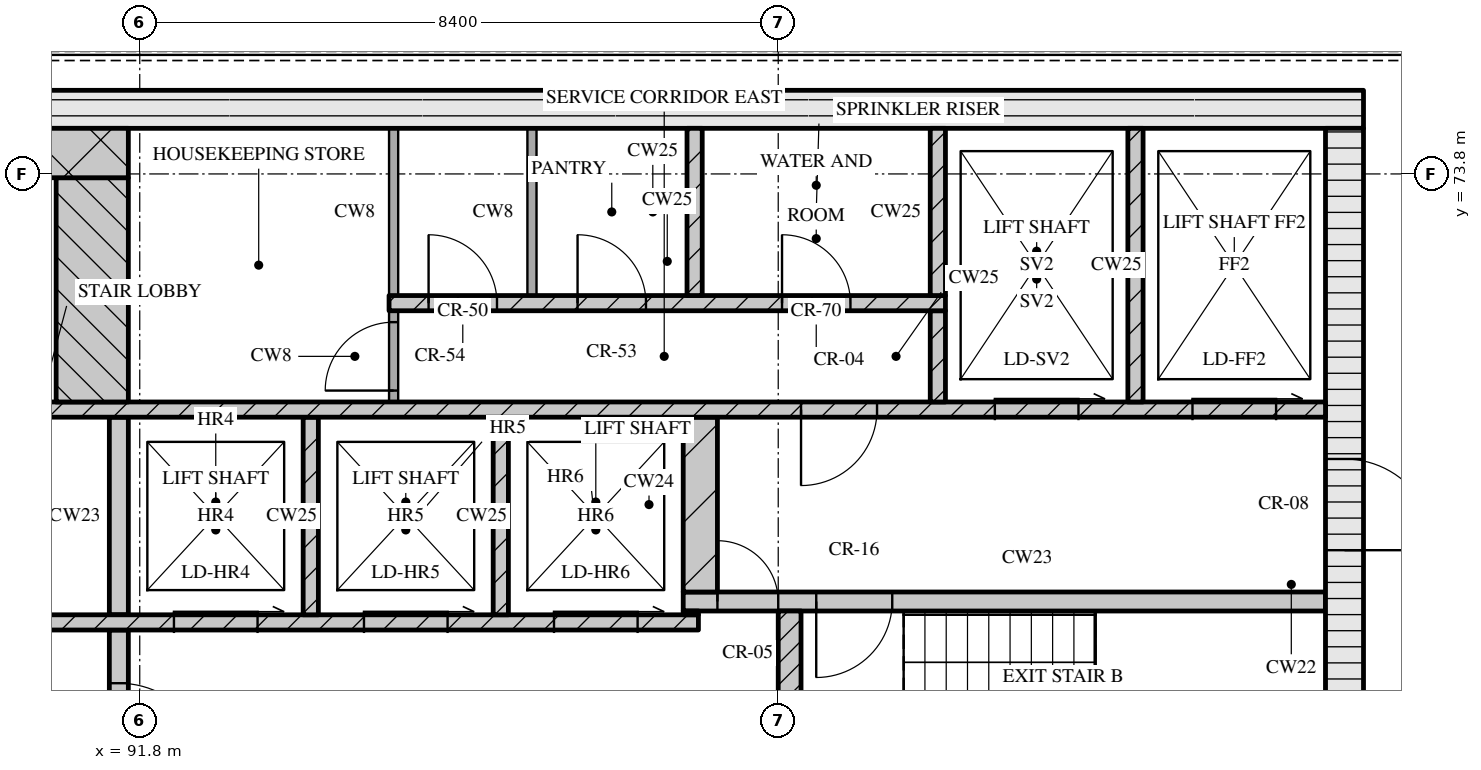
"""IFC4 building model, lengths in metres.
Left out: names, types, materials, properties, quantities, classifications, styles, units other than length and angle.
Written with IfcOpenShell. Run it as: python <this file> out.ifc"""

import sys

from ifc_helpers import new_model, si_unit, direction, frame, frame_2d, origin, place, context, subcontext, project, spatial, rectangle, extrude, element, fill, save


model = new_model("IFC4")
c1 = context("Model", 3, precision=1e-05, world=origin(), true_north=direction((0.0, 1.0)))
c2 = subcontext(c1, "Body", "Model", "MODEL_VIEW")
j1 = project(units=[si_unit("LENGTHUNIT", "METRE"), si_unit("PLANEANGLEUNIT", "RADIAN")], contexts=[c1])
p1 = place(None, origin())
s1 = spatial("IfcSite", under=j1, at=p1, CompositionType="ELEMENT")
p2 = place(p1, origin())
s2 = spatial("IfcBuilding", under=s1, at=p2, CompositionType="ELEMENT")
p3 = place(p2, frame((0.0, 0.0, 277.95)))
s3 = spatial("IfcBuildingStorey", under=s2, at=p3, CompositionType="ELEMENT", Elevation=277.95)
p4 = place(p3, frame((67.3, 74.65, 0.0), z_axis=(0.0, 0.0, 1.0), x_axis=(1.0, 0.0, 0.0)))
e1 = element("IfcWall", 1, at=p4, inside=s3, PredefinedType="SOLIDWALL", context=c2, shape_type="SweptSolid", body=[
    extrude(rectangle(XDim=40.6, YDim=0.5, at=frame_2d((20.3, 0.0))), origin(), (0.0, 0.0, 1.0), 3.32),
])
p5 = place(p3, frame((107.65, 62.4, 0.0), z_axis=(0.0, 0.0, 1.0), x_axis=(0.0, 1.0, 0.0)))
e2 = element("IfcWall", 2, at=p5, inside=s3, PredefinedType="SOLIDWALL", context=c2, shape_type="SweptSolid", body=[
    extrude(rectangle(XDim=12.0, YDim=0.5, at=frame_2d((6.0, 0.0))), origin(), (0.0, 0.0, 1.0), 3.32),
])
p6 = place(p5, frame((6.45, 0.0, 0.0)))
e3 = element("IfcOpeningElement", 3, at=p6, cuts=e2, PredefinedType="OPENING", context=c2, shape_type="SweptSolid", body=[
    extrude(rectangle(XDim=1.2, YDim=2.1, at=frame_2d((0.6, 1.05))), frame((0.0, 0.26, 0.0), z_axis=(0.0, -1.0, 0.0), x_axis=(1.0, 0.0, 0.0)), (0.0, 0.0, 1.0), 0.52),
])
p7 = place(p3, frame((91.525, 65.2, 0.0), z_axis=(0.0, 0.0, 1.0), x_axis=(0.0, 1.0, 0.0)))
e4 = element("IfcWall", 4, at=p7, inside=s3, PredefinedType="SOLIDWALL", context=c2, shape_type="SweptSolid", body=[
    extrude(rectangle(XDim=2.6, YDim=0.25, at=frame_2d((1.3, 0.0))), origin(), (0.0, 0.0, 1.0), 3.32),
])
p8 = place(p7, frame((0.7, 0.0, 0.0)))
e5 = element("IfcOpeningElement", 5, at=p8, cuts=e4, PredefinedType="OPENING", context=c2, shape_type="SweptSolid", body=[
    extrude(rectangle(XDim=1.2, YDim=2.1, at=frame_2d((0.6, 1.05))), frame((0.0, 0.135, 0.0), z_axis=(0.0, -1.0, 0.0), x_axis=(1.0, 0.0, 0.0)), (0.0, 0.0, 1.0), 0.27),
])
p9 = place(p3, frame((100.35, 65.2, 0.0), z_axis=(0.0, 0.0, 1.0), x_axis=(0.0, 1.0, 0.0)))
e6 = element("IfcWall", 6, at=p9, inside=s3, PredefinedType="SOLIDWALL", context=c2, shape_type="SweptSolid", body=[
    extrude(rectangle(XDim=2.85, YDim=0.3, at=frame_2d((1.425, 0.0))), origin(), (0.0, 0.0, 1.0), 3.32),
])
p10 = place(p3, frame((76.05, 67.9, 0.0), z_axis=(0.0, 0.0, 1.0), x_axis=(1.0, 0.0, 0.0)))
e7 = element("IfcWall", 7, at=p10, inside=s3, PredefinedType="SOLIDWALL", context=c2, shape_type="SweptSolid", body=[
    extrude(rectangle(XDim=23.1, YDim=0.2, at=frame_2d((11.55, 0.0))), origin(), (0.0, 0.0, 1.0), 3.32),
])
p11 = place(p10, frame((1.35, 0.0, 0.0)))
e8 = element("IfcOpeningElement", 8, at=p11, cuts=e7, PredefinedType="OPENING", context=c2, shape_type="SweptSolid", body=[
    extrude(rectangle(XDim=0.9, YDim=2.1, at=frame_2d((0.45, 1.05))), frame((0.0, 0.11, 0.0), z_axis=(0.0, -1.0, 0.0), x_axis=(1.0, 0.0, 0.0)), (0.0, 0.0, 1.0), 0.22),
])
p12 = place(p10, frame((5.06, 0.0, 0.0)))
e9 = element("IfcOpeningElement", 9, at=p12, cuts=e7, PredefinedType="OPENING", context=c2, shape_type="SweptSolid", body=[
    extrude(rectangle(XDim=0.9, YDim=2.1, at=frame_2d((0.45, 1.05))), frame((0.0, 0.11, 0.0), z_axis=(0.0, -1.0, 0.0), x_axis=(1.0, 0.0, 0.0)), (0.0, 0.0, 1.0), 0.22),
])
p13 = place(p10, frame((8.45, 0.0, 0.0)))
e10 = element("IfcOpeningElement", 10, at=p13, cuts=e7, PredefinedType="OPENING", context=c2, shape_type="SweptSolid", body=[
    extrude(rectangle(XDim=0.9, YDim=2.1, at=frame_2d((0.45, 1.05))), frame((0.0, 0.11, 0.0), z_axis=(0.0, -1.0, 0.0), x_axis=(1.0, 0.0, 0.0)), (0.0, 0.0, 1.0), 0.22),
])
p14 = place(p10, frame((10.91, 0.0, 0.0)))
e11 = element("IfcOpeningElement", 11, at=p14, cuts=e7, PredefinedType="OPENING", context=c2, shape_type="SweptSolid", body=[
    extrude(rectangle(XDim=0.9, YDim=2.1, at=frame_2d((0.45, 1.05))), frame((0.0, 0.11, 0.0), z_axis=(0.0, -1.0, 0.0), x_axis=(1.0, 0.0, 0.0)), (0.0, 0.0, 1.0), 0.22),
])
p15 = place(p10, frame((13.55, 0.0, 0.0)))
e12 = element("IfcOpeningElement", 12, at=p15, cuts=e7, PredefinedType="OPENING", context=c2, shape_type="SweptSolid", body=[
    extrude(rectangle(XDim=1.0, YDim=2.1, at=frame_2d((0.5, 1.05))), frame((0.0, 0.11, 0.0), z_axis=(0.0, -1.0, 0.0), x_axis=(1.0, 0.0, 0.0)), (0.0, 0.0, 1.0), 0.22),
])
p16 = place(p10, frame((16.2, 0.0, 0.0)))
e13 = element("IfcOpeningElement", 13, at=p16, cuts=e7, PredefinedType="OPENING", context=c2, shape_type="SweptSolid", body=[
    extrude(rectangle(XDim=1.1, YDim=2.1, at=frame_2d((0.55, 1.05))), frame((0.0, 0.11, 0.0), z_axis=(0.0, -1.0, 0.0), x_axis=(1.0, 0.0, 0.0)), (0.0, 0.0, 1.0), 0.22),
])
p17 = place(p10, frame((18.7, 0.0, 0.0)))
e14 = element("IfcOpeningElement", 14, at=p17, cuts=e7, PredefinedType="OPENING", context=c2, shape_type="SweptSolid", body=[
    extrude(rectangle(XDim=1.1, YDim=2.1, at=frame_2d((0.55, 1.05))), frame((0.0, 0.11, 0.0), z_axis=(0.0, -1.0, 0.0), x_axis=(1.0, 0.0, 0.0)), (0.0, 0.0, 1.0), 0.22),
])
p18 = place(p10, frame((21.2, 0.0, 0.0)))
e15 = element("IfcOpeningElement", 15, at=p18, cuts=e7, PredefinedType="OPENING", context=c2, shape_type="SweptSolid", body=[
    extrude(rectangle(XDim=1.1, YDim=2.1, at=frame_2d((0.55, 1.05))), frame((0.0, 0.11, 0.0), z_axis=(0.0, -1.0, 0.0), x_axis=(1.0, 0.0, 0.0)), (0.0, 0.0, 1.0), 0.22),
])
p19 = place(p3, frame((91.525, 68.0, 0.0), z_axis=(0.0, 0.0, 1.0), x_axis=(0.0, 1.0, 0.0)))
e16 = element("IfcWall", 16, at=p19, inside=s3, PredefinedType="SOLIDWALL", context=c2, shape_type="SweptSolid", body=[
    extrude(rectangle(XDim=2.6, YDim=0.25, at=frame_2d((1.3, 0.0))), origin(), (0.0, 0.0, 1.0), 3.32),
])
for number, where, z_axis, x_axis in (
    (17, (94.05, 68.0, 0.0), (0.0, 0.0, 1.0), (0.0, 1.0, 0.0)),
    (18, (96.55, 68.0, 0.0), (0.0, 0.0, 1.0), (0.0, 1.0, 0.0)),
):
    element("IfcWall", number, at=place(p3, frame(where, z_axis=z_axis, x_axis=x_axis)), inside=s3, PredefinedType="SOLIDWALL", context=c2, shape_type="SweptSolid", body=[
        extrude(rectangle(XDim=2.6, YDim=0.2, at=frame_2d((1.3, 0.0))), origin(), (0.0, 0.0, 1.0), 3.32),
    ])
p20 = place(p3, frame((98.95, 68.025, 0.0), z_axis=(0.0, 0.0, 1.0), x_axis=(1.0, 0.0, 0.0)))
e19 = element("IfcWall", 19, at=p20, inside=s3, PredefinedType="SOLIDWALL", context=c2, shape_type="SweptSolid", body=[
    extrude(rectangle(XDim=0.2, YDim=0.05, at=frame_2d((0.1, 0.0))), origin(), (0.0, 0.0, 1.0), 3.32),
])
p21 = place(p3, frame((98.95, 68.175, 0.0), z_axis=(0.0, 0.0, 1.0), x_axis=(1.0, 0.0, 0.0)))
e20 = element("IfcWall", 20, at=p21, inside=s3, PredefinedType="SOLIDWALL", context=c2, shape_type="SweptSolid", body=[
    extrude(rectangle(XDim=8.45, YDim=0.25, at=frame_2d((4.225, 0.0))), origin(), (0.0, 0.0, 1.0), 3.32),
])
p22 = place(p21, frame((0.45, 0.0, 0.0)))
e21 = element("IfcOpeningElement", 21, at=p22, cuts=e20, PredefinedType="OPENING", context=c2, shape_type="SweptSolid", body=[
    extrude(rectangle(XDim=0.8, YDim=2.1, at=frame_2d((0.4, 1.05))), frame((0.0, 0.135, 0.0), z_axis=(0.0, -1.0, 0.0), x_axis=(1.0, 0.0, 0.0)), (0.0, 0.0, 1.0), 0.27),
])
p23 = place(p21, frame((1.75, 0.0, 0.0)))
e22 = element("IfcOpeningElement", 22, at=p23, cuts=e20, PredefinedType="OPENING", context=c2, shape_type="SweptSolid", body=[
    extrude(rectangle(XDim=1.0, YDim=2.1, at=frame_2d((0.5, 1.05))), frame((0.0, 0.135, 0.0), z_axis=(0.0, -1.0, 0.0), x_axis=(1.0, 0.0, 0.0)), (0.0, 0.0, 1.0), 0.27),
])
p24 = place(p3, frame((99.175, 68.3, 0.0), z_axis=(0.0, 0.0, 1.0), x_axis=(0.0, 1.0, 0.0)))
e23 = element("IfcWall", 23, at=p24, inside=s3, PredefinedType="SOLIDWALL", context=c2, shape_type="SweptSolid", body=[
    extrude(rectangle(XDim=2.3, YDim=0.45, at=frame_2d((1.15, 0.0))), origin(), (0.0, 0.0, 1.0), 3.32),
])
p25 = place(p3, frame((67.8, 70.7, 0.0), z_axis=(0.0, 0.0, 1.0), x_axis=(1.0, 0.0, 0.0)))
e24 = element("IfcWall", 24, at=p25, inside=s3, PredefinedType="SOLIDWALL", context=c2, shape_type="SweptSolid", body=[
    extrude(rectangle(XDim=39.6, YDim=0.2, at=frame_2d((19.8, 0.0))), origin(), (0.0, 0.0, 1.0), 3.32),
])
p26 = place(p25, frame((0.65, 0.0, 0.0)))
e25 = element("IfcOpeningElement", 25, at=p26, cuts=e24, PredefinedType="OPENING", context=c2, shape_type="SweptSolid", body=[
    extrude(rectangle(XDim=1.1, YDim=2.1, at=frame_2d((0.55, 1.05))), frame((0.0, 0.11, 0.0), z_axis=(0.0, -1.0, 0.0), x_axis=(1.0, 0.0, 0.0)), (0.0, 0.0, 1.0), 0.22),
])
p27 = place(p25, frame((3.25, 0.0, 0.0)))
e26 = element("IfcOpeningElement", 26, at=p27, cuts=e24, PredefinedType="OPENING", context=c2, shape_type="SweptSolid", body=[
    extrude(rectangle(XDim=1.1, YDim=2.1, at=frame_2d((0.55, 1.05))), frame((0.0, 0.11, 0.0), z_axis=(0.0, -1.0, 0.0), x_axis=(1.0, 0.0, 0.0)), (0.0, 0.0, 1.0), 0.22),
])
p28 = place(p25, frame((5.9, 0.0, 0.0)))
e27 = element("IfcOpeningElement", 27, at=p28, cuts=e24, PredefinedType="OPENING", context=c2, shape_type="SweptSolid", body=[
    extrude(rectangle(XDim=1.0, YDim=2.1, at=frame_2d((0.5, 1.05))), frame((0.0, 0.11, 0.0), z_axis=(0.0, -1.0, 0.0), x_axis=(1.0, 0.0, 0.0)), (0.0, 0.0, 1.0), 0.22),
])
p29 = place(p25, frame((21.7, 0.0, 0.0)))
e28 = element("IfcOpeningElement", 28, at=p29, cuts=e24, PredefinedType="OPENING", context=c2, shape_type="SweptSolid", body=[
    extrude(rectangle(XDim=1.0, YDim=2.1, at=frame_2d((0.5, 1.05))), frame((0.0, 0.11, 0.0), z_axis=(0.0, -1.0, 0.0), x_axis=(1.0, 0.0, 0.0)), (0.0, 0.0, 1.0), 0.22),
])
p30 = place(p25, frame((32.7, 0.0, 0.0)))
e29 = element("IfcOpeningElement", 29, at=p30, cuts=e24, PredefinedType="OPENING", context=c2, shape_type="SweptSolid", body=[
    extrude(rectangle(XDim=1.0, YDim=2.1, at=frame_2d((0.5, 1.05))), frame((0.0, 0.11, 0.0), z_axis=(0.0, -1.0, 0.0), x_axis=(1.0, 0.0, 0.0)), (0.0, 0.0, 1.0), 0.22),
])
p31 = place(p25, frame((35.25, 0.0, 0.0)))
e30 = element("IfcOpeningElement", 30, at=p31, cuts=e24, PredefinedType="OPENING", context=c2, shape_type="SweptSolid", body=[
    extrude(rectangle(XDim=1.1, YDim=2.1, at=frame_2d((0.55, 1.05))), frame((0.0, 0.11, 0.0), z_axis=(0.0, -1.0, 0.0), x_axis=(1.0, 0.0, 0.0)), (0.0, 0.0, 1.0), 0.22),
])
p32 = place(p25, frame((37.85, 0.0, 0.0)))
e31 = element("IfcOpeningElement", 31, at=p32, cuts=e24, PredefinedType="OPENING", context=c2, shape_type="SweptSolid", body=[
    extrude(rectangle(XDim=1.1, YDim=2.1, at=frame_2d((0.55, 1.05))), frame((0.0, 0.11, 0.0), z_axis=(0.0, -1.0, 0.0), x_axis=(1.0, 0.0, 0.0)), (0.0, 0.0, 1.0), 0.22),
])
p33 = place(p3, frame((91.175, 70.8, 0.0), z_axis=(0.0, 0.0, 1.0), x_axis=(0.0, 1.0, 0.0)))
e32 = element("IfcWall", 32, at=p33, inside=s3, PredefinedType="SOLIDWALL", context=c2, shape_type="SweptSolid", body=[
    extrude(rectangle(XDim=2.95, YDim=0.95, at=frame_2d((1.475, 0.0))), origin(), (0.0, 0.0, 1.0), 3.32),
])
p34 = place(p3, frame((95.14, 70.8, 0.0), z_axis=(0.0, 0.0, 1.0), x_axis=(0.0, 1.0, 0.0)))
e33 = element("IfcWall", 33, at=p34, inside=s3, PredefinedType="PARTITIONING", context=c2, shape_type="SweptSolid", body=[
    extrude(rectangle(XDim=1.2, YDim=0.12, at=frame_2d((0.6, 0.0))), origin(), (0.0, 0.0, 1.0), 3.32),
])
p35 = place(p34, frame((0.15, 0.0, 0.0)))
e34 = element("IfcOpeningElement", 34, at=p35, cuts=e33, PredefinedType="OPENING", context=c2, shape_type="SweptSolid", body=[
    extrude(rectangle(XDim=0.9, YDim=2.1, at=frame_2d((0.45, 1.05))), frame((0.0, 0.07, 0.0), z_axis=(0.0, -1.0, 0.0), x_axis=(1.0, 0.0, 0.0)), (0.0, 0.0, 1.0), 0.14),
])
p36 = place(p3, frame((102.3, 70.8, 0.0), z_axis=(0.0, 0.0, 1.0), x_axis=(0.0, 1.0, 0.0)))
e35 = element("IfcWall", 35, at=p36, inside=s3, PredefinedType="SOLIDWALL", context=c2, shape_type="SweptSolid", body=[
    extrude(rectangle(XDim=1.2, YDim=0.2, at=frame_2d((0.6, 0.0))), origin(), (0.0, 0.0, 1.0), 3.32),
])
p37 = place(p3, frame((104.9, 70.8, 0.0), z_axis=(0.0, 0.0, 1.0), x_axis=(0.0, 1.0, 0.0)))
e36 = element("IfcWall", 36, at=p37, inside=s3, PredefinedType="SOLIDWALL", context=c2, shape_type="SweptSolid", body=[
    extrude(rectangle(XDim=3.6, YDim=0.2, at=frame_2d((1.8, 0.0))), origin(), (0.0, 0.0, 1.0), 3.32),
])
p38 = place(p3, frame((95.08, 72.1, 0.0), z_axis=(0.0, 0.0, 1.0), x_axis=(1.0, 0.0, 0.0)))
e37 = element("IfcWall", 37, at=p38, inside=s3, PredefinedType="SOLIDWALL", context=c2, shape_type="SweptSolid", body=[
    extrude(rectangle(XDim=7.32, YDim=0.2, at=frame_2d((3.66, 0.0))), origin(), (0.0, 0.0, 1.0), 3.32),
])
p39 = place(p38, frame((0.52, 0.0, 0.0)))
e38 = element("IfcOpeningElement", 38, at=p39, cuts=e37, PredefinedType="OPENING", context=c2, shape_type="SweptSolid", body=[
    extrude(rectangle(XDim=0.9, YDim=2.1, at=frame_2d((0.45, 1.05))), frame((0.0, 0.11, 0.0), z_axis=(0.0, -1.0, 0.0), x_axis=(1.0, 0.0, 0.0)), (0.0, 0.0, 1.0), 0.22),
])
p40 = place(p38, frame((2.48, 0.0, 0.0)))
e39 = element("IfcOpeningElement", 39, at=p40, cuts=e37, PredefinedType="OPENING", context=c2, shape_type="SweptSolid", body=[
    extrude(rectangle(XDim=0.9, YDim=2.1, at=frame_2d((0.45, 1.05))), frame((0.0, 0.11, 0.0), z_axis=(0.0, -1.0, 0.0), x_axis=(1.0, 0.0, 0.0)), (0.0, 0.0, 1.0), 0.22),
])
p41 = place(p38, frame((5.17, 0.0, 0.0)))
e40 = element("IfcOpeningElement", 40, at=p41, cuts=e37, PredefinedType="OPENING", context=c2, shape_type="SweptSolid", body=[
    extrude(rectangle(XDim=0.9, YDim=2.1, at=frame_2d((0.45, 1.05))), frame((0.0, 0.11, 0.0), z_axis=(0.0, -1.0, 0.0), x_axis=(1.0, 0.0, 0.0)), (0.0, 0.0, 1.0), 0.22),
])
for number, where, z_axis, x_axis in (
    (41, (95.14, 72.2, 0.0), (0.0, 0.0, 1.0), (0.0, 1.0, 0.0)),
    (42, (96.96, 72.2, 0.0), (0.0, 0.0, 1.0), (0.0, 1.0, 0.0)),
):
    element("IfcWall", number, at=place(p3, frame(where, z_axis=z_axis, x_axis=x_axis)), inside=s3, PredefinedType="PARTITIONING", context=c2, shape_type="SweptSolid", body=[
        extrude(rectangle(XDim=2.2, YDim=0.12, at=frame_2d((1.1, 0.0))), origin(), (0.0, 0.0, 1.0), 3.32),
    ])
for number, where, z_axis, x_axis in (
    (43, (99.1, 72.2, 0.0), (0.0, 0.0, 1.0), (0.0, 1.0, 0.0)),
    (44, (102.3, 72.2, 0.0), (0.0, 0.0, 1.0), (0.0, 1.0, 0.0)),
):
    element("IfcWall", number, at=place(p3, frame(where, z_axis=z_axis, x_axis=x_axis)), inside=s3, PredefinedType="SOLIDWALL", context=c2, shape_type="SweptSolid", body=[
        extrude(rectangle(XDim=2.2, YDim=0.2, at=frame_2d((1.1, 0.0))), origin(), (0.0, 0.0, 1.0), 3.32),
    ])
p42 = place(p3, frame((83.55, 74.075, 0.0), z_axis=(0.0, 0.0, 1.0), x_axis=(1.0, 0.0, 0.0)))
e45 = element("IfcWall", 45, at=p42, inside=s3, PredefinedType="SOLIDWALL", context=c2, shape_type="SweptSolid", body=[
    extrude(rectangle(XDim=8.1, YDim=0.65, at=frame_2d((4.05, 0.0))), origin(), (0.0, 0.0, 1.0), 3.32),
])
p43 = place(p8, origin())
e46 = element("IfcDoor", 46, at=p43, inside=s3, OperationType="SINGLE_SWING_RIGHT", PredefinedType="DOOR", context=c2, shape_type="SweptSolid", body=[
    extrude(rectangle(XDim=1.2, YDim=2.1, at=frame_2d((0.6, 1.05))), frame((0.0, 0.025, 0.0), z_axis=(0.0, -1.0, 0.0), x_axis=(1.0, 0.0, 0.0)), (0.0, 0.0, 1.0), 0.05),
])
fill(e5, e46)
p44 = place(p16, origin())
e47 = element("IfcDoor", 47, at=p44, inside=s3, OperationType="SLIDING_TO_RIGHT", PredefinedType="DOOR", context=c2, shape_type="SweptSolid", body=[
    extrude(rectangle(XDim=1.1, YDim=2.1, at=frame_2d((0.55, 1.05))), frame((0.0, 0.025, 0.0), z_axis=(0.0, -1.0, 0.0), x_axis=(1.0, 0.0, 0.0)), (0.0, 0.0, 1.0), 0.05),
])
fill(e13, e47)
p45 = place(p17, origin())
e48 = element("IfcDoor", 48, at=p45, inside=s3, OperationType="SLIDING_TO_RIGHT", PredefinedType="DOOR", context=c2, shape_type="SweptSolid", body=[
    extrude(rectangle(XDim=1.1, YDim=2.1, at=frame_2d((0.55, 1.05))), frame((0.0, 0.025, 0.0), z_axis=(0.0, -1.0, 0.0), x_axis=(1.0, 0.0, 0.0)), (0.0, 0.0, 1.0), 0.05),
])
fill(e14, e48)
p46 = place(p18, origin())
e49 = element("IfcDoor", 49, at=p46, inside=s3, OperationType="SLIDING_TO_RIGHT", PredefinedType="DOOR", context=c2, shape_type="SweptSolid", body=[
    extrude(rectangle(XDim=1.1, YDim=2.1, at=frame_2d((0.55, 1.05))), frame((0.0, 0.025, 0.0), z_axis=(0.0, -1.0, 0.0), x_axis=(1.0, 0.0, 0.0)), (0.0, 0.0, 1.0), 0.05),
])
fill(e15, e49)
p47 = place(p22, origin())
e50 = element("IfcDoor", 50, at=p47, inside=s3, OperationType="SINGLE_SWING_LEFT", PredefinedType="DOOR", context=c2, shape_type="SweptSolid", body=[
    extrude(rectangle(XDim=0.8, YDim=2.1, at=frame_2d((0.4, 1.05))), frame((0.0, 0.025, 0.0), z_axis=(0.0, -1.0, 0.0), x_axis=(1.0, 0.0, 0.0)), (0.0, 0.0, 1.0), 0.05),
])
fill(e21, e50)
p48 = place(p23, origin())
e51 = element("IfcDoor", 51, at=p48, inside=s3, OperationType="SINGLE_SWING_RIGHT", PredefinedType="DOOR", context=c2, shape_type="SweptSolid", body=[
    extrude(rectangle(XDim=1.0, YDim=2.1, at=frame_2d((0.5, 1.05))), frame((0.0, 0.025, 0.0), z_axis=(0.0, -1.0, 0.0), x_axis=(1.0, 0.0, 0.0)), (0.0, 0.0, 1.0), 0.05),
])
fill(e22, e51)
p49 = place(p6, origin())
e52 = element("IfcDoor", 52, at=p49, inside=s3, OperationType="SINGLE_SWING_RIGHT", PredefinedType="DOOR", context=c2, shape_type="SweptSolid", body=[
    extrude(rectangle(XDim=1.2, YDim=2.1, at=frame_2d((0.6, 1.05))), frame((0.0, 0.025, 0.0), z_axis=(0.0, -1.0, 0.0), x_axis=(1.0, 0.0, 0.0)), (0.0, 0.0, 1.0), 0.05),
])
fill(e3, e52)
p50 = place(p30, origin())
e53 = element("IfcDoor", 53, at=p50, inside=s3, OperationType="SINGLE_SWING_RIGHT", PredefinedType="DOOR", context=c2, shape_type="SweptSolid", body=[
    extrude(rectangle(XDim=1.0, YDim=2.1, at=frame_2d((0.5, 1.05))), frame((0.0, 0.025, 0.0), z_axis=(0.0, -1.0, 0.0), x_axis=(1.0, 0.0, 0.0)), (0.0, 0.0, 1.0), 0.05),
])
fill(e29, e53)
p51 = place(p31, origin())
e54 = element("IfcDoor", 54, at=p51, inside=s3, OperationType="SLIDING_TO_RIGHT", PredefinedType="DOOR", context=c2, shape_type="SweptSolid", body=[
    extrude(rectangle(XDim=1.1, YDim=2.1, at=frame_2d((0.55, 1.05))), frame((0.0, 0.025, 0.0), z_axis=(0.0, -1.0, 0.0), x_axis=(1.0, 0.0, 0.0)), (0.0, 0.0, 1.0), 0.05),
])
fill(e30, e54)
p52 = place(p32, origin())
e55 = element("IfcDoor", 55, at=p52, inside=s3, OperationType="SLIDING_TO_RIGHT", PredefinedType="DOOR", context=c2, shape_type="SweptSolid", body=[
    extrude(rectangle(XDim=1.1, YDim=2.1, at=frame_2d((0.55, 1.05))), frame((0.0, 0.025, 0.0), z_axis=(0.0, -1.0, 0.0), x_axis=(1.0, 0.0, 0.0)), (0.0, 0.0, 1.0), 0.05),
])
fill(e31, e55)
p53 = place(p35, origin())
e56 = element("IfcDoor", 56, at=p53, inside=s3, OperationType="SINGLE_SWING_LEFT", PredefinedType="DOOR", context=c2, shape_type="SweptSolid", body=[
    extrude(rectangle(XDim=0.9, YDim=2.1, at=frame_2d((0.45, 1.05))), frame((0.0, 0.025, 0.0), z_axis=(0.0, -1.0, 0.0), x_axis=(1.0, 0.0, 0.0)), (0.0, 0.0, 1.0), 0.05),
])
fill(e34, e56)
p54 = place(p39, origin())
e57 = element("IfcDoor", 57, at=p54, inside=s3, OperationType="SINGLE_SWING_LEFT", PredefinedType="DOOR", context=c2, shape_type="SweptSolid", body=[
    extrude(rectangle(XDim=0.9, YDim=2.1, at=frame_2d((0.45, 1.05))), frame((0.0, 0.025, 0.0), z_axis=(0.0, -1.0, 0.0), x_axis=(1.0, 0.0, 0.0)), (0.0, 0.0, 1.0), 0.05),
])
fill(e38, e57)
p55 = place(p40, origin())
e58 = element("IfcDoor", 58, at=p55, inside=s3, OperationType="SINGLE_SWING_LEFT", PredefinedType="DOOR", context=c2, shape_type="SweptSolid", body=[
    extrude(rectangle(XDim=0.9, YDim=2.1, at=frame_2d((0.45, 1.05))), frame((0.0, 0.025, 0.0), z_axis=(0.0, -1.0, 0.0), x_axis=(1.0, 0.0, 0.0)), (0.0, 0.0, 1.0), 0.05),
])
fill(e39, e58)
p56 = place(p41, origin())
e59 = element("IfcDoor", 59, at=p56, inside=s3, OperationType="SINGLE_SWING_LEFT", PredefinedType="DOOR", context=c2, shape_type="SweptSolid", body=[
    extrude(rectangle(XDim=0.9, YDim=2.1, at=frame_2d((0.45, 1.05))), frame((0.0, 0.025, 0.0), z_axis=(0.0, -1.0, 0.0), x_axis=(1.0, 0.0, 0.0)), (0.0, 0.0, 1.0), 0.05),
])
fill(e40, e59)
save(model, sys.argv[1])
